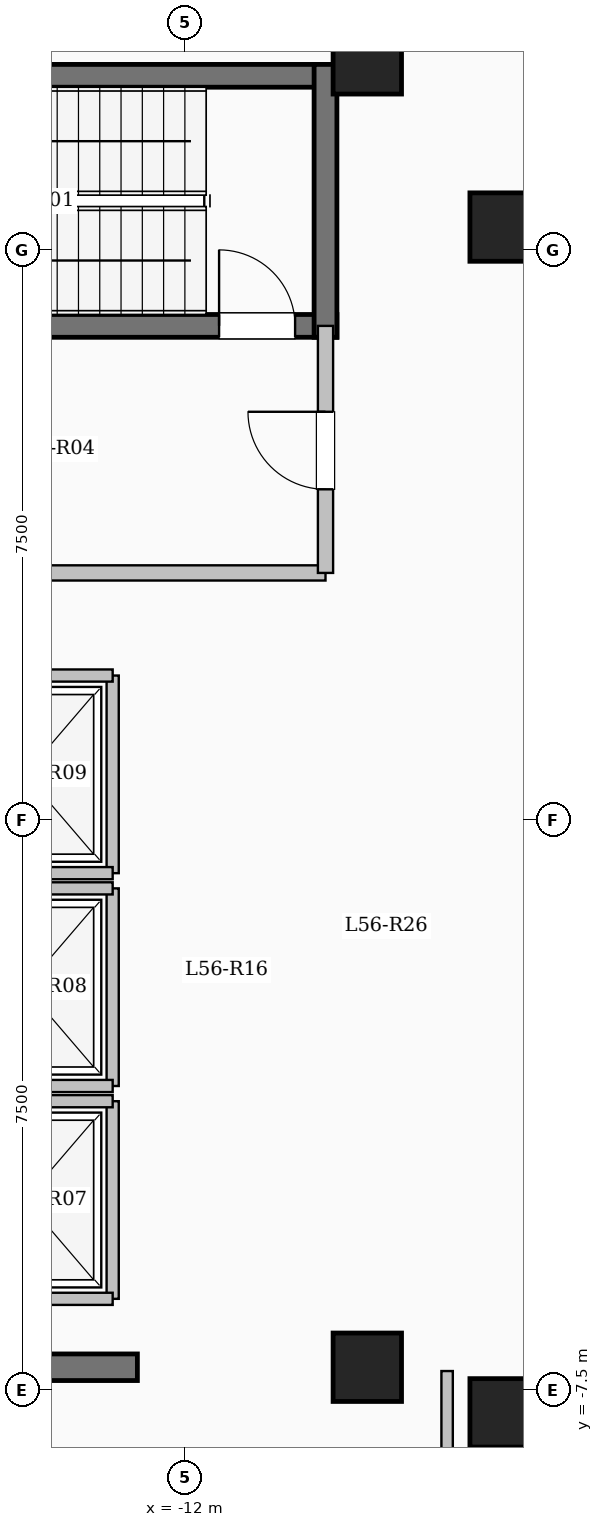
"""IFC4 building model, lengths in metres.
Left out: names, types, materials, properties, quantities, classifications, styles, units other than length and angle.
Written with IfcOpenShell. Run it as: python <this file> out.ifc"""

import sys

from ifc_helpers import new_model, si_unit, direction, frame, frame_2d, origin, origin_2d, place, context, subcontext, project, spatial, rectangle, extrude, element, fill, save


model = new_model("IFC4")
c1 = context("Model", 3, precision=1e-05, world=origin(), true_north=direction((0.0, 1.0)))
c2 = subcontext(c1, "Body", "Model", "MODEL_VIEW")
j1 = project(units=[si_unit("LENGTHUNIT", "METRE"), si_unit("PLANEANGLEUNIT", "RADIAN")], contexts=[c1])
p1 = place(None, origin())
s1 = spatial("IfcSite", under=j1, at=p1, CompositionType="ELEMENT")
p2 = place(p1, origin())
s2 = spatial("IfcBuilding", under=s1, at=p2, CompositionType="ELEMENT")
p3 = place(p2, frame((0.0, 0.0, 207.0)))
s3 = spatial("IfcBuildingStorey", under=s2, at=p3, CompositionType="ELEMENT", Elevation=207.0)
for number, where, z_axis, x_axis in (
    (1, (-7.8, -7.8, 0.0), (0.0, 0.0, 1.0), (1.0, 0.0, 0.0)),
    (2, (-7.8, 7.8, 0.0), (0.0, 0.0, 1.0), (1.0, 0.0, 0.0)),
    (3, (-9.6, -7.2, 0.0), (0.0, 0.0, 1.0), (1.0, 0.0, 0.0)),
    (4, (-9.6, 10.0, 0.0), (0.0, 0.0, 1.0), (1.0, 0.0, 0.0)),
):
    element("IfcColumn", number, at=place(p3, frame(where, z_axis=z_axis, x_axis=x_axis)), inside=s3, PredefinedType="COLUMN", context=c2, shape_type="SweptSolid", body=[
        extrude(rectangle(XDim=0.9, YDim=0.9, at=origin_2d()), origin(), (0.0, 0.0, 1.0), 3.35),
    ])
p4 = place(p3, frame((-18.0, 9.79, 0.0), z_axis=(0.0, 0.0, 1.0), x_axis=(1.0, 0.0, 0.0)))
e5 = element("IfcWall", 5, at=p4, inside=s3, PredefinedType="SHEAR", context=c2, shape_type="SweptSolid", body=[
    extrude(rectangle(XDim=8.0, YDim=0.3, at=frame_2d((4.0, 0.0))), origin(), (0.0, 0.0, 1.0), 3.35),
])
p5 = place(p3, frame((-18.0, 6.5, 0.0), z_axis=(0.0, 0.0, 1.0), x_axis=(1.0, 0.0, 0.0)))
e6 = element("IfcWall", 6, at=p5, inside=s3, PredefinedType="SHEAR", context=c2, shape_type="SweptSolid", body=[
    extrude(rectangle(XDim=8.0, YDim=0.3, at=frame_2d((4.0, 0.0))), origin(), (0.0, 0.0, 1.0), 3.35),
])
p6 = place(p5, frame((6.45, 0.0, 0.0)))
e7 = element("IfcOpeningElement", 7, at=p6, cuts=e6, PredefinedType="OPENING", context=c2, shape_type="SweptSolid", body=[
    extrude(rectangle(XDim=1.0, YDim=2.15, at=frame_2d((0.5, 1.075))), frame((0.0, 0.16, 0.0), z_axis=(0.0, -1.0, 0.0), x_axis=(1.0, 0.0, 0.0)), (0.0, 0.0, 1.0), 0.32),
])
p7 = place(p3, frame((-10.15, 6.35, 0.0), z_axis=(0.0, 0.0, 1.0), x_axis=(0.0, 1.0, 0.0)))
e8 = element("IfcWall", 8, at=p7, inside=s3, PredefinedType="SHEAR", context=c2, shape_type="SweptSolid", body=[
    extrude(rectangle(XDim=3.59, YDim=0.3, at=frame_2d((1.795, 0.0))), origin(), (0.0, 0.0, 1.0), 3.35),
])
p8 = place(p3, frame((-15.55, 3.25, 0.0), z_axis=(0.0, 0.0, 1.0), x_axis=(1.0, 0.0, 0.0)))
e9 = element("IfcWall", 9, at=p8, inside=s3, PredefinedType="SOLIDWALL", context=c2, shape_type="SweptSolid", body=[
    extrude(rectangle(XDim=5.4, YDim=0.2, at=frame_2d((2.7, 0.0))), origin(), (0.0, 0.0, 1.0), 3.1),
])
p9 = place(p3, frame((-10.15, 3.25, 0.0), z_axis=(0.0, 0.0, 1.0), x_axis=(0.0, 1.0, 0.0)))
e10 = element("IfcWall", 10, at=p9, inside=s3, PredefinedType="SOLIDWALL", context=c2, shape_type="SweptSolid", body=[
    extrude(rectangle(XDim=3.25, YDim=0.2, at=frame_2d((1.625, 0.0))), origin(), (0.0, 0.0, 1.0), 3.1),
])
p10 = place(p9, frame((1.1, 0.0, 0.0)))
e11 = element("IfcOpeningElement", 11, at=p10, cuts=e10, PredefinedType="OPENING", context=c2, shape_type="SweptSolid", body=[
    extrude(rectangle(XDim=1.02, YDim=2.15, at=frame_2d((0.51, 1.075))), frame((0.0, 0.11, 0.0), z_axis=(0.0, -1.0, 0.0), x_axis=(1.0, 0.0, 0.0)), (0.0, 0.0, 1.0), 0.22),
])
p11 = place(p3, frame((-12.95, -6.3, 0.0), z_axis=(0.0, 0.0, 1.0), x_axis=(0.0, 1.0, 0.0)))
e12 = element("IfcWall", 12, at=p11, inside=s3, PredefinedType="SOLIDWALL", context=c2, shape_type="SweptSolid", body=[
    extrude(rectangle(XDim=2.6, YDim=0.16, at=frame_2d((1.3, 0.0))), origin(), (0.0, 0.0, 1.0), 3.1),
])
for number, where, z_axis, x_axis in (
    (13, (-15.25, -6.3, 0.0), (0.0, 0.0, 1.0), (1.0, 0.0, 0.0)),
    (14, (-15.25, -3.7, 0.0), (0.0, 0.0, 1.0), (1.0, 0.0, 0.0)),
):
    element("IfcWall", number, at=place(p3, frame(where, z_axis=z_axis, x_axis=x_axis)), inside=s3, PredefinedType="SOLIDWALL", context=c2, shape_type="SweptSolid", body=[
        extrude(rectangle(XDim=2.3, YDim=0.16, at=frame_2d((1.15, 0.0))), origin(), (0.0, 0.0, 1.0), 3.1),
    ])
p12 = place(p3, frame((-12.95, -3.5, 0.0), z_axis=(0.0, 0.0, 1.0), x_axis=(0.0, 1.0, 0.0)))
e15 = element("IfcWall", 15, at=p12, inside=s3, PredefinedType="SOLIDWALL", context=c2, shape_type="SweptSolid", body=[
    extrude(rectangle(XDim=2.6, YDim=0.16, at=frame_2d((1.3, 0.0))), origin(), (0.0, 0.0, 1.0), 3.1),
])
for number, where, z_axis, x_axis in (
    (16, (-15.25, -3.5, 0.0), (0.0, 0.0, 1.0), (1.0, 0.0, 0.0)),
    (17, (-15.25, -0.9, 0.0), (0.0, 0.0, 1.0), (1.0, 0.0, 0.0)),
):
    element("IfcWall", number, at=place(p3, frame(where, z_axis=z_axis, x_axis=x_axis)), inside=s3, PredefinedType="SOLIDWALL", context=c2, shape_type="SweptSolid", body=[
        extrude(rectangle(XDim=2.3, YDim=0.16, at=frame_2d((1.15, 0.0))), origin(), (0.0, 0.0, 1.0), 3.1),
    ])
p13 = place(p3, frame((-12.95, -0.7, 0.0), z_axis=(0.0, 0.0, 1.0), x_axis=(0.0, 1.0, 0.0)))
e18 = element("IfcWall", 18, at=p13, inside=s3, PredefinedType="SOLIDWALL", context=c2, shape_type="SweptSolid", body=[
    extrude(rectangle(XDim=2.6, YDim=0.16, at=frame_2d((1.3, 0.0))), origin(), (0.0, 0.0, 1.0), 3.1),
])
for number, where, z_axis, x_axis in (
    (19, (-15.25, -0.7, 0.0), (0.0, 0.0, 1.0), (1.0, 0.0, 0.0)),
    (20, (-15.25, 1.9, 0.0), (0.0, 0.0, 1.0), (1.0, 0.0, 0.0)),
):
    element("IfcWall", number, at=place(p3, frame(where, z_axis=z_axis, x_axis=x_axis)), inside=s3, PredefinedType="SOLIDWALL", context=c2, shape_type="SweptSolid", body=[
        extrude(rectangle(XDim=2.3, YDim=0.16, at=frame_2d((1.15, 0.0))), origin(), (0.0, 0.0, 1.0), 3.1),
    ])
p14 = place(p3, frame((-18.625, -7.2, 0.0), z_axis=(0.0, 0.0, 1.0), x_axis=(1.0, 0.0, 0.0)))
e21 = element("IfcWall", 21, at=p14, inside=s3, PredefinedType="SHEAR", context=c2, shape_type="SweptSolid", body=[
    extrude(rectangle(XDim=6.0, YDim=0.35, at=frame_2d((3.0, 0.0))), origin(), (0.0, 0.0, 1.0), 3.35),
])
p15 = place(p14, frame((1.725, 0.0, 0.0)))
e22 = element("IfcOpeningElement", 22, at=p15, cuts=e21, PredefinedType="OPENING", context=c2, shape_type="SweptSolid", body=[
    extrude(rectangle(XDim=1.12, YDim=2.15, at=frame_2d((0.56, 1.075))), frame((0.0, 0.185, 0.0), z_axis=(0.0, -1.0, 0.0), x_axis=(1.0, 0.0, 0.0)), (0.0, 0.0, 1.0), 0.37),
])
p16 = place(p3, frame((-8.55, -9.4, 0.0), z_axis=(0.0, 0.0, 1.0), x_axis=(0.0, 1.0, 0.0)))
e23 = element("IfcWall", 23, at=p16, inside=s3, PredefinedType="PARTITIONING", context=c2, shape_type="SweptSolid", body=[
    extrude(rectangle(XDim=2.15, YDim=0.15, at=frame_2d((1.075, 0.0))), origin(), (0.0, 0.0, 1.0), 3.1),
])
p17 = place(p6, origin())
e24 = element("IfcDoor", 24, at=p17, inside=s3, OperationType="SINGLE_SWING_LEFT", PredefinedType="DOOR", context=c2, shape_type="SweptSolid", body=[
    extrude(rectangle(XDim=1.0, YDim=2.15, at=frame_2d((0.5, 1.075))), frame((0.0, 0.025, 0.0), z_axis=(0.0, -1.0, 0.0), x_axis=(1.0, 0.0, 0.0)), (0.0, 0.0, 1.0), 0.05),
])
fill(e7, e24)
p18 = place(p10, origin())
e25 = element("IfcDoor", 25, at=p18, inside=s3, OperationType="SINGLE_SWING_RIGHT", PredefinedType="DOOR", context=c2, shape_type="SweptSolid", body=[
    extrude(rectangle(XDim=1.02, YDim=2.15, at=frame_2d((0.51, 1.075))), frame((0.0, 0.025, 0.0), z_axis=(0.0, -1.0, 0.0), x_axis=(1.0, 0.0, 0.0)), (0.0, 0.0, 1.0), 0.05),
])
fill(e11, e25)
save(model, sys.argv[1])
